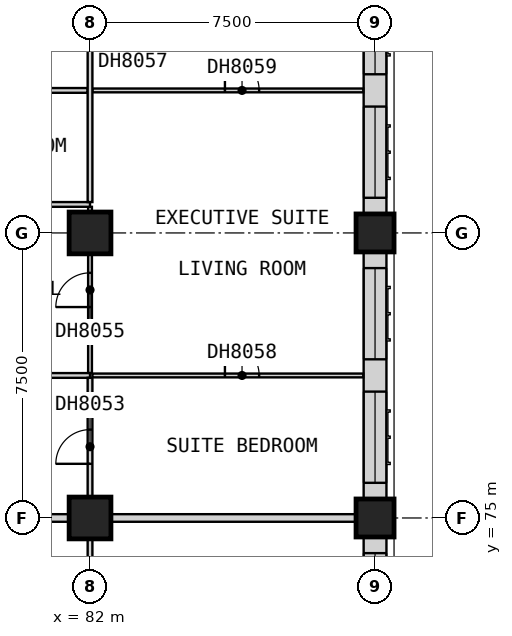
"""IFC4 building model, lengths in metres.
Left out: names, types, materials, properties, quantities, classifications, styles, units other than length and angle.
Written with IfcOpenShell. Run it as: python <this file> out.ifc"""

import sys

from ifc_helpers import new_model, si_unit, direction, frame, frame_2d, origin, origin_2d, place, context, subcontext, project, spatial, rectangle, extrude, element, fill, save


model = new_model("IFC4")
c1 = context("Model", 3, precision=1e-05, world=origin(), true_north=direction((0.0, 1.0)))
c2 = subcontext(c1, "Body", "Model", "MODEL_VIEW")
j1 = project(units=[si_unit("LENGTHUNIT", "METRE"), si_unit("PLANEANGLEUNIT", "RADIAN")], contexts=[c1])
p1 = place(None, origin())
s1 = spatial("IfcSite", under=j1, at=p1, CompositionType="ELEMENT")
p2 = place(p1, origin())
s2 = spatial("IfcBuilding", under=s1, at=p2, CompositionType="ELEMENT")
p3 = place(p2, frame((0.0, 0.0, 89.9)))
s3 = spatial("IfcBuildingStorey", under=s2, at=p3, CompositionType="ELEMENT", Elevation=89.9)
for number, where, z_axis, x_axis in (
    (1, (82.0, 75.0, 0.0), (0.0, 0.0, 1.0), (1.0, 0.0, 0.0)),
    (2, (82.0, 82.5, 0.0), (0.0, 0.0, 1.0), (1.0, 0.0, 0.0)),
):
    element("IfcColumn", number, at=place(p3, frame(where, z_axis=z_axis, x_axis=x_axis)), inside=s3, PredefinedType="COLUMN", context=c2, shape_type="SweptSolid", body=[
        extrude(rectangle(XDim=1.1, YDim=1.1, at=origin_2d()), origin(), (0.0, 0.0, 1.0), 3.6),
    ])
for number, where, z_axis, x_axis in (
    (3, (89.5, 75.0, 0.0), (0.0, 0.0, 1.0), (1.0, 0.0, 0.0)),
    (4, (89.5, 82.5, 0.0), (0.0, 0.0, 1.0), (1.0, 0.0, 0.0)),
):
    element("IfcColumn", number, at=place(p3, frame(where, z_axis=z_axis, x_axis=x_axis)), inside=s3, PredefinedType="COLUMN", context=c2, shape_type="SweptSolid", body=[
        extrude(rectangle(XDim=1.0, YDim=1.0, at=origin_2d()), origin(), (0.0, 0.0, 1.0), 3.6),
    ])
p4 = place(p3, frame((89.5, 68.0, 0.0), z_axis=(0.0, 0.0, 1.0), x_axis=(0.0, 1.0, 0.0)))
e5 = element("IfcWall", 5, at=p4, inside=s3, PredefinedType="SOLIDWALL", context=c2, shape_type="SweptSolid", body=[
    extrude(rectangle(XDim=6.5, YDim=0.6, at=frame_2d((3.25, 0.0))), origin(), (0.0, 0.0, 1.0), 2.85),
])
p5 = place(p4, frame((0.425, 0.0, 0.8)))
e6 = element("IfcOpeningElement", 6, at=p5, cuts=e5, PredefinedType="OPENING", context=c2, shape_type="SweptSolid", body=[
    extrude(rectangle(XDim=2.4, YDim=1.8, at=frame_2d((1.2, 0.9))), frame((0.0, 0.31, 0.0), z_axis=(0.0, -1.0, 0.0), x_axis=(1.0, 0.0, 0.0)), (0.0, 0.0, 1.0), 0.62),
])
p6 = place(p4, frame((3.675, 0.0, 0.8)))
e7 = element("IfcOpeningElement", 7, at=p6, cuts=e5, PredefinedType="OPENING", context=c2, shape_type="SweptSolid", body=[
    extrude(rectangle(XDim=2.4, YDim=1.8, at=frame_2d((1.2, 0.9))), frame((0.0, 0.31, 0.0), z_axis=(0.0, -1.0, 0.0), x_axis=(1.0, 0.0, 0.0)), (0.0, 0.0, 1.0), 0.62),
])
p7 = place(p3, frame((89.5, 75.5, 0.0), z_axis=(0.0, 0.0, 1.0), x_axis=(0.0, 1.0, 0.0)))
e8 = element("IfcWall", 8, at=p7, inside=s3, PredefinedType="SOLIDWALL", context=c2, shape_type="SweptSolid", body=[
    extrude(rectangle(XDim=6.5, YDim=0.6, at=frame_2d((3.25, 0.0))), origin(), (0.0, 0.0, 1.0), 2.85),
])
p8 = place(p7, frame((0.425, 0.0, 0.8)))
e9 = element("IfcOpeningElement", 9, at=p8, cuts=e8, PredefinedType="OPENING", context=c2, shape_type="SweptSolid", body=[
    extrude(rectangle(XDim=2.4, YDim=1.8, at=frame_2d((1.2, 0.9))), frame((0.0, 0.31, 0.0), z_axis=(0.0, -1.0, 0.0), x_axis=(1.0, 0.0, 0.0)), (0.0, 0.0, 1.0), 0.62),
])
p9 = place(p7, frame((3.675, 0.0, 0.8)))
e10 = element("IfcOpeningElement", 10, at=p9, cuts=e8, PredefinedType="OPENING", context=c2, shape_type="SweptSolid", body=[
    extrude(rectangle(XDim=2.4, YDim=1.8, at=frame_2d((1.2, 0.9))), frame((0.0, 0.31, 0.0), z_axis=(0.0, -1.0, 0.0), x_axis=(1.0, 0.0, 0.0)), (0.0, 0.0, 1.0), 0.62),
])
p10 = place(p3, frame((89.5, 83.0, 0.0), z_axis=(0.0, 0.0, 1.0), x_axis=(0.0, 1.0, 0.0)))
e11 = element("IfcWall", 11, at=p10, inside=s3, PredefinedType="SOLIDWALL", context=c2, shape_type="SweptSolid", body=[
    extrude(rectangle(XDim=6.5, YDim=0.6, at=frame_2d((3.25, 0.0))), origin(), (0.0, 0.0, 1.0), 2.85),
])
p11 = place(p10, frame((0.425, 0.0, 0.8)))
e12 = element("IfcOpeningElement", 12, at=p11, cuts=e11, PredefinedType="OPENING", context=c2, shape_type="SweptSolid", body=[
    extrude(rectangle(XDim=2.4, YDim=1.8, at=frame_2d((1.2, 0.9))), frame((0.0, 0.31, 0.0), z_axis=(0.0, -1.0, 0.0), x_axis=(1.0, 0.0, 0.0)), (0.0, 0.0, 1.0), 0.62),
])
p12 = place(p10, frame((3.675, 0.0, 0.8)))
e13 = element("IfcOpeningElement", 13, at=p12, cuts=e11, PredefinedType="OPENING", context=c2, shape_type="SweptSolid", body=[
    extrude(rectangle(XDim=2.4, YDim=1.8, at=frame_2d((1.2, 0.9))), frame((0.0, 0.31, 0.0), z_axis=(0.0, -1.0, 0.0), x_axis=(1.0, 0.0, 0.0)), (0.0, 0.0, 1.0), 0.62),
])
p13 = place(p3, frame((77.475, 75.0, 0.0), z_axis=(0.0, 0.0, 1.0), x_axis=(1.0, 0.0, 0.0)))
e14 = element("IfcWall", 14, at=p13, inside=s3, PredefinedType="PARTITIONING", context=c2, shape_type="SweptSolid", body=[
    extrude(rectangle(XDim=12.525, YDim=0.2, at=frame_2d((6.262, 0.0))), origin(), (0.0, 0.0, 1.0), 3.35),
])
p14 = place(p3, frame((82.062, 78.75, 0.0), z_axis=(0.0, 0.0, 1.0), x_axis=(1.0, 0.0, 0.0)))
e15 = element("IfcWall", 15, at=p14, inside=s3, PredefinedType="PARTITIONING", context=c2, shape_type="SweptSolid", body=[
    extrude(rectangle(XDim=7.127, YDim=0.1, at=frame_2d((3.564, 0.0))), origin(), (0.0, 0.0, 1.0), 3.35),
])
p15 = place(p14, frame((3.488, 0.0, 0.0)))
e16 = element("IfcOpeningElement", 16, at=p15, cuts=e15, PredefinedType="OPENING", context=c2, shape_type="SweptSolid", body=[
    extrude(rectangle(XDim=0.9, YDim=2.1, at=frame_2d((0.45, 1.05))), frame((0.0, 0.06, 0.0), z_axis=(0.0, -1.0, 0.0), x_axis=(1.0, 0.0, 0.0)), (0.0, 0.0, 1.0), 0.12),
])
p16 = place(p3, frame((82.062, 86.25, 0.0), z_axis=(0.0, 0.0, 1.0), x_axis=(1.0, 0.0, 0.0)))
e17 = element("IfcWall", 17, at=p16, inside=s3, PredefinedType="PARTITIONING", context=c2, shape_type="SweptSolid", body=[
    extrude(rectangle(XDim=7.127, YDim=0.1, at=frame_2d((3.564, 0.0))), origin(), (0.0, 0.0, 1.0), 3.35),
])
p17 = place(p16, frame((3.488, 0.0, 0.0)))
e18 = element("IfcOpeningElement", 18, at=p17, cuts=e17, PredefinedType="OPENING", context=c2, shape_type="SweptSolid", body=[
    extrude(rectangle(XDim=0.9, YDim=2.1, at=frame_2d((0.45, 1.05))), frame((0.0, 0.06, 0.0), z_axis=(0.0, -1.0, 0.0), x_axis=(1.0, 0.0, 0.0)), (0.0, 0.0, 1.0), 0.12),
])
p18 = place(p3, frame((82.0, 78.812, 0.0), z_axis=(0.0, 0.0, 1.0), x_axis=(0.0, 1.0, 0.0)))
e19 = element("IfcWall", 19, at=p18, inside=s3, PredefinedType="PARTITIONING", context=c2, shape_type="SweptSolid", body=[
    extrude(rectangle(XDim=4.375, YDim=0.1, at=frame_2d((2.188, 0.0))), origin(), (0.0, 0.0, 1.0), 3.35),
])
p19 = place(p18, frame((1.738, 0.0, 0.0)))
e20 = element("IfcOpeningElement", 20, at=p19, cuts=e19, PredefinedType="OPENING", context=c2, shape_type="SweptSolid", body=[
    extrude(rectangle(XDim=0.9, YDim=2.1, at=frame_2d((0.45, 1.05))), frame((0.0, 0.06, 0.0), z_axis=(0.0, -1.0, 0.0), x_axis=(1.0, 0.0, 0.0)), (0.0, 0.0, 1.0), 0.12),
])
p20 = place(p3, frame((77.475, 78.75, 0.0), z_axis=(0.0, 0.0, 1.0), x_axis=(1.0, 0.0, 0.0)))
e21 = element("IfcWall", 21, at=p20, inside=s3, PredefinedType="PARTITIONING", context=c2, shape_type="SweptSolid", body=[
    extrude(rectangle(XDim=4.525, YDim=0.125, at=frame_2d((2.262, 0.0))), origin(), (0.0, 0.0, 1.0), 3.35),
])
p21 = place(p3, frame((77.475, 83.25, 0.0), z_axis=(0.0, 0.0, 1.0), x_axis=(1.0, 0.0, 0.0)))
e22 = element("IfcWall", 22, at=p21, inside=s3, PredefinedType="PARTITIONING", context=c2, shape_type="SweptSolid", body=[
    extrude(rectangle(XDim=4.525, YDim=0.125, at=frame_2d((2.262, 0.0))), origin(), (0.0, 0.0, 1.0), 3.35),
])
p22 = place(p21, frame((1.775, 0.0, 0.0)))
e23 = element("IfcOpeningElement", 23, at=p22, cuts=e22, PredefinedType="OPENING", context=c2, shape_type="SweptSolid", body=[
    extrude(rectangle(XDim=0.9, YDim=2.1, at=frame_2d((0.45, 1.05))), frame((0.0, 0.073, 0.0), z_axis=(0.0, -1.0, 0.0), x_axis=(1.0, 0.0, 0.0)), (0.0, 0.0, 1.0), 0.145),
])
p23 = place(p3, frame((77.475, 86.25, 0.0), z_axis=(0.0, 0.0, 1.0), x_axis=(1.0, 0.0, 0.0)))
e24 = element("IfcWall", 24, at=p23, inside=s3, PredefinedType="PARTITIONING", context=c2, shape_type="SweptSolid", body=[
    extrude(rectangle(XDim=4.462, YDim=0.125, at=frame_2d((2.231, 0.0))), origin(), (0.0, 0.0, 1.0), 3.35),
])
p24 = place(p3, frame((82.0, 68.312, 0.0), z_axis=(0.0, 0.0, 1.0), x_axis=(0.0, 1.0, 0.0)))
e25 = element("IfcWall", 25, at=p24, inside=s3, PredefinedType="PARTITIONING", context=c2, shape_type="SweptSolid", body=[
    extrude(rectangle(XDim=10.375, YDim=0.125, at=frame_2d((5.188, 0.0))), origin(), (0.0, 0.0, 1.0), 3.35),
])
p25 = place(p24, frame((4.363, 0.0, 0.0)))
e26 = element("IfcOpeningElement", 26, at=p25, cuts=e25, PredefinedType="OPENING", context=c2, shape_type="SweptSolid", body=[
    extrude(rectangle(XDim=0.9, YDim=2.1, at=frame_2d((0.45, 1.05))), frame((0.0, 0.073, 0.0), z_axis=(0.0, -1.0, 0.0), x_axis=(1.0, 0.0, 0.0)), (0.0, 0.0, 1.0), 0.145),
])
p26 = place(p24, frame((8.113, 0.0, 0.0)))
e27 = element("IfcOpeningElement", 27, at=p26, cuts=e25, PredefinedType="OPENING", context=c2, shape_type="SweptSolid", body=[
    extrude(rectangle(XDim=0.9, YDim=2.1, at=frame_2d((0.45, 1.05))), frame((0.0, 0.073, 0.0), z_axis=(0.0, -1.0, 0.0), x_axis=(1.0, 0.0, 0.0)), (0.0, 0.0, 1.0), 0.145),
])
p27 = place(p3, frame((82.0, 83.312, 0.0), z_axis=(0.0, 0.0, 1.0), x_axis=(0.0, 1.0, 0.0)))
e28 = element("IfcWall", 28, at=p27, inside=s3, PredefinedType="PARTITIONING", context=c2, shape_type="SweptSolid", body=[
    extrude(rectangle(XDim=6.587, YDim=0.125, at=frame_2d((3.294, 0.0))), origin(), (0.0, 0.0, 1.0), 3.35),
])
p28 = place(p27, frame((4.363, 0.0, 0.0)))
e29 = element("IfcOpeningElement", 29, at=p28, cuts=e28, PredefinedType="OPENING", context=c2, shape_type="SweptSolid", body=[
    extrude(rectangle(XDim=0.9, YDim=2.1, at=frame_2d((0.45, 1.05))), frame((0.0, 0.073, 0.0), z_axis=(0.0, -1.0, 0.0), x_axis=(1.0, 0.0, 0.0)), (0.0, 0.0, 1.0), 0.145),
])
p29 = place(p6, origin())
e30 = element("IfcWindow", 30, at=p29, inside=s3, PartitioningType="SINGLE_PANEL", PredefinedType="WINDOW", context=c2, shape_type="SweptSolid", body=[
    extrude(rectangle(XDim=2.4, YDim=1.8, at=frame_2d((1.2, 0.9))), frame((0.0, -0.07, 0.0), z_axis=(0.0, -1.0, 0.0), x_axis=(1.0, 0.0, 0.0)), (0.0, 0.0, 1.0), 0.06),
])
fill(e7, e30)
p30 = place(p8, origin())
e31 = element("IfcWindow", 31, at=p30, inside=s3, PartitioningType="SINGLE_PANEL", PredefinedType="WINDOW", context=c2, shape_type="SweptSolid", body=[
    extrude(rectangle(XDim=2.4, YDim=1.8, at=frame_2d((1.2, 0.9))), frame((0.0, -0.07, 0.0), z_axis=(0.0, -1.0, 0.0), x_axis=(1.0, 0.0, 0.0)), (0.0, 0.0, 1.0), 0.06),
])
fill(e9, e31)
p31 = place(p9, origin())
e32 = element("IfcWindow", 32, at=p31, inside=s3, PartitioningType="SINGLE_PANEL", PredefinedType="WINDOW", context=c2, shape_type="SweptSolid", body=[
    extrude(rectangle(XDim=2.4, YDim=1.8, at=frame_2d((1.2, 0.9))), frame((0.0, -0.07, 0.0), z_axis=(0.0, -1.0, 0.0), x_axis=(1.0, 0.0, 0.0)), (0.0, 0.0, 1.0), 0.06),
])
fill(e10, e32)
p32 = place(p11, origin())
e33 = element("IfcWindow", 33, at=p32, inside=s3, PartitioningType="SINGLE_PANEL", PredefinedType="WINDOW", context=c2, shape_type="SweptSolid", body=[
    extrude(rectangle(XDim=2.4, YDim=1.8, at=frame_2d((1.2, 0.9))), frame((0.0, -0.07, 0.0), z_axis=(0.0, -1.0, 0.0), x_axis=(1.0, 0.0, 0.0)), (0.0, 0.0, 1.0), 0.06),
])
fill(e12, e33)
p33 = place(p12, origin())
e34 = element("IfcWindow", 34, at=p33, inside=s3, PartitioningType="SINGLE_PANEL", PredefinedType="WINDOW", context=c2, shape_type="SweptSolid", body=[
    extrude(rectangle(XDim=2.4, YDim=1.8, at=frame_2d((1.2, 0.9))), frame((0.0, -0.07, 0.0), z_axis=(0.0, -1.0, 0.0), x_axis=(1.0, 0.0, 0.0)), (0.0, 0.0, 1.0), 0.06),
])
fill(e13, e34)
p34 = place(p26, origin())
e35 = element("IfcDoor", 35, at=p34, inside=s3, OperationType="SINGLE_SWING_LEFT", PredefinedType="DOOR", context=c2, shape_type="SweptSolid", body=[
    extrude(rectangle(XDim=0.9, YDim=2.1, at=frame_2d((0.45, 1.05))), frame((0.0, 0.025, 0.0), z_axis=(0.0, -1.0, 0.0), x_axis=(1.0, 0.0, 0.0)), (0.0, 0.0, 1.0), 0.05),
])
fill(e27, e35)
p35 = place(p19, origin())
e36 = element("IfcDoor", 36, at=p35, inside=s3, OperationType="SINGLE_SWING_LEFT", PredefinedType="DOOR", context=c2, shape_type="SweptSolid", body=[
    extrude(rectangle(XDim=0.9, YDim=2.1, at=frame_2d((0.45, 1.05))), frame((0.0, 0.025, 0.0), z_axis=(0.0, -1.0, 0.0), x_axis=(1.0, 0.0, 0.0)), (0.0, 0.0, 1.0), 0.05),
])
fill(e20, e36)
p36 = place(p15, origin())
e37 = element("IfcDoor", 37, at=p36, inside=s3, OperationType="SINGLE_SWING_RIGHT", PredefinedType="DOOR", context=c2, shape_type="SweptSolid", body=[
    extrude(rectangle(XDim=0.9, YDim=2.1, at=frame_2d((0.45, 1.05))), frame((0.0, 0.025, 0.0), z_axis=(0.0, -1.0, 0.0), x_axis=(1.0, 0.0, 0.0)), (0.0, 0.0, 1.0), 0.05),
])
fill(e16, e37)
p37 = place(p17, origin())
e38 = element("IfcDoor", 38, at=p37, inside=s3, OperationType="SINGLE_SWING_RIGHT", PredefinedType="DOOR", context=c2, shape_type="SweptSolid", body=[
    extrude(rectangle(XDim=0.9, YDim=2.1, at=frame_2d((0.45, 1.05))), frame((0.0, 0.025, 0.0), z_axis=(0.0, -1.0, 0.0), x_axis=(1.0, 0.0, 0.0)), (0.0, 0.0, 1.0), 0.05),
])
fill(e18, e38)
save(model, sys.argv[1])
